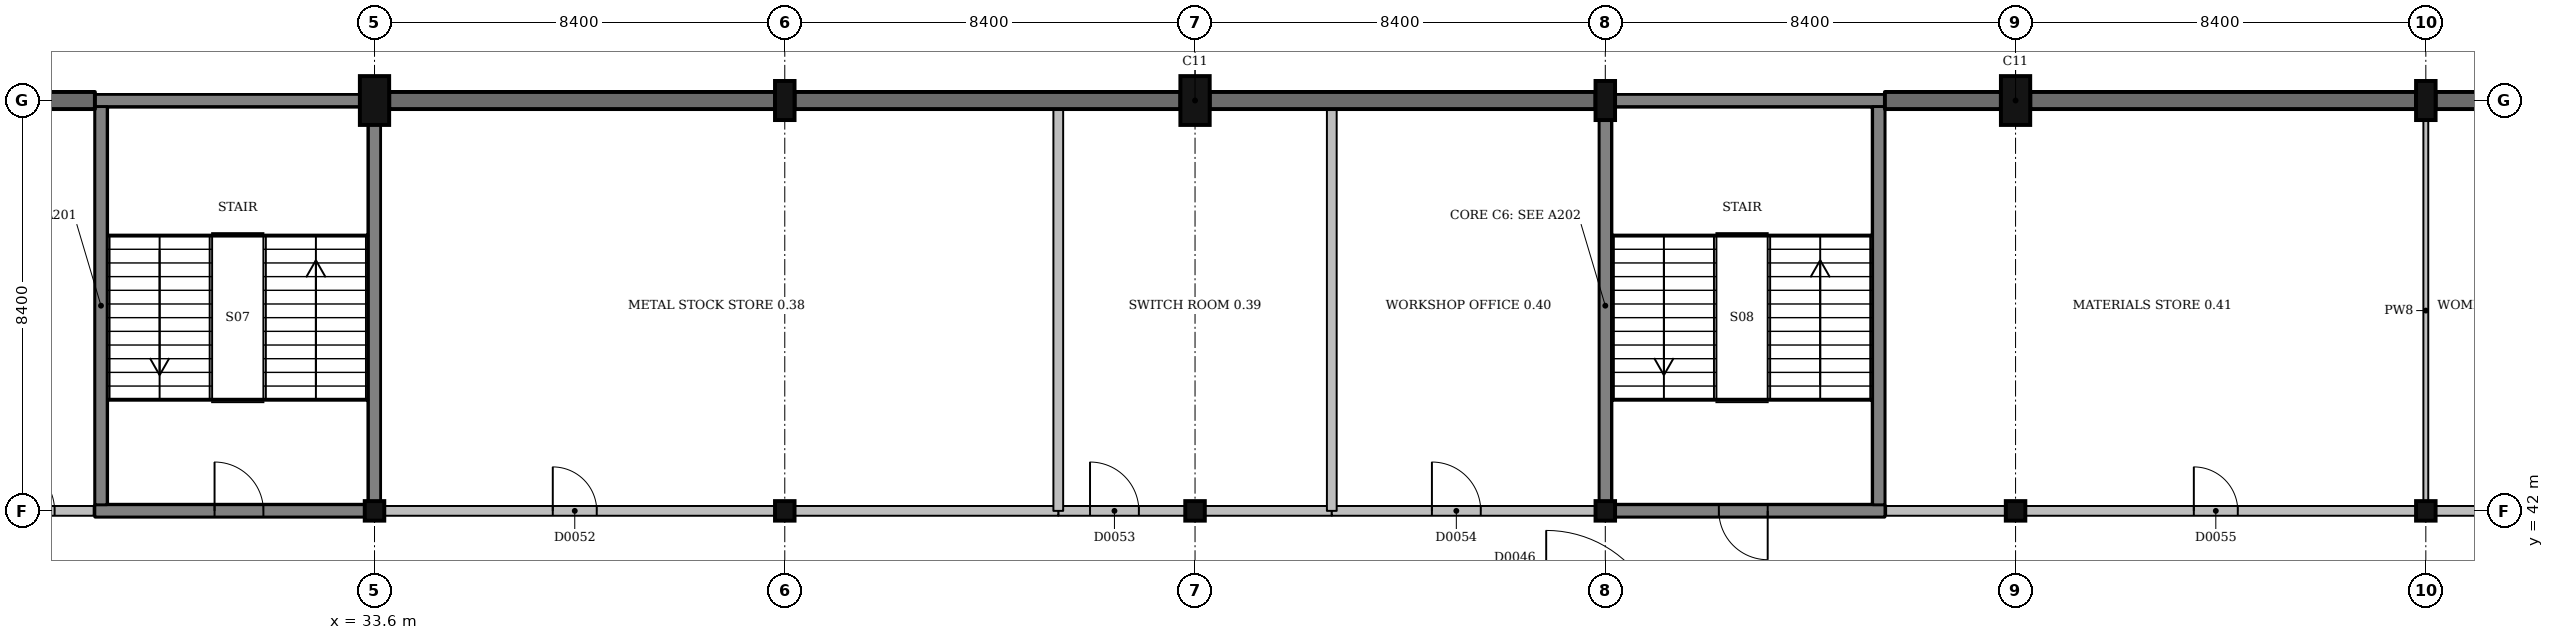
"""IFC4 building model, lengths in metres.
Left out: names, types, materials, properties, quantities, classifications, styles, units other than length and angle.
Written with IfcOpenShell. Run it as: python <this file> out.ifc"""

import sys

from ifc_helpers import new_model, si_unit, direction, frame, frame_2d, origin, origin_2d, place, context, subcontext, project, spatial, rectangle, extrude, element, fill, save


model = new_model("IFC4")
c1 = context("Model", 3, precision=1e-05, world=origin(), true_north=direction((0.0, 1.0)))
c2 = subcontext(c1, "Body", "Model", "MODEL_VIEW")
j1 = project(units=[si_unit("LENGTHUNIT", "METRE"), si_unit("PLANEANGLEUNIT", "RADIAN")], contexts=[c1])
p1 = place(None, origin())
s1 = spatial("IfcSite", under=j1, at=p1, CompositionType="ELEMENT")
p2 = place(p1, origin())
s2 = spatial("IfcBuilding", under=s1, at=p2, CompositionType="ELEMENT")
p3 = place(p2, origin())
s3 = spatial("IfcBuildingStorey", under=s2, at=p3, CompositionType="ELEMENT", Elevation=0.0)
p4 = place(p3, frame((33.6, 42.0, -1.5), z_axis=(0.0, 0.0, 1.0), x_axis=(1.0, 0.0, 0.0)))
e1 = element("IfcColumn", 1, at=p4, inside=s3, PredefinedType="COLUMN", context=c2, shape_type="SweptSolid", body=[
    extrude(rectangle(XDim=0.4, YDim=0.4, at=origin_2d()), origin(), (0.0, 0.0, 1.0), 6.0),
])
p5 = place(p3, frame((33.6, 50.4, -1.5), z_axis=(0.0, 0.0, 1.0), x_axis=(1.0, 0.0, 0.0)))
e2 = element("IfcColumn", 2, at=p5, inside=s3, PredefinedType="COLUMN", context=c2, shape_type="SweptSolid", body=[
    extrude(rectangle(XDim=0.6, YDim=1.0, at=origin_2d()), origin(), (0.0, 0.0, 1.0), 6.0),
])
p6 = place(p3, frame((42.0, 42.0, -1.5), z_axis=(0.0, 0.0, 1.0), x_axis=(1.0, 0.0, 0.0)))
e3 = element("IfcColumn", 3, at=p6, inside=s3, PredefinedType="COLUMN", context=c2, shape_type="SweptSolid", body=[
    extrude(rectangle(XDim=0.4, YDim=0.4, at=origin_2d()), origin(), (0.0, 0.0, 1.0), 6.0),
])
p7 = place(p3, frame((42.0, 50.4, -0.35), z_axis=(0.0, 0.0, 1.0), x_axis=(1.0, 0.0, 0.0)))
e4 = element("IfcColumn", 4, at=p7, inside=s3, PredefinedType="COLUMN", context=c2, shape_type="SweptSolid", body=[
    extrude(rectangle(XDim=0.4, YDim=0.8, at=origin_2d()), origin(), (0.0, 0.0, 1.0), 4.85),
])
p8 = place(p3, frame((50.4, 42.0, -1.5), z_axis=(0.0, 0.0, 1.0), x_axis=(1.0, 0.0, 0.0)))
e5 = element("IfcColumn", 5, at=p8, inside=s3, PredefinedType="COLUMN", context=c2, shape_type="SweptSolid", body=[
    extrude(rectangle(XDim=0.4, YDim=0.4, at=origin_2d()), origin(), (0.0, 0.0, 1.0), 6.0),
])
p9 = place(p3, frame((50.4, 50.4, -0.35), z_axis=(0.0, 0.0, 1.0), x_axis=(1.0, 0.0, 0.0)))
e6 = element("IfcColumn", 6, at=p9, inside=s3, PredefinedType="COLUMN", context=c2, shape_type="SweptSolid", body=[
    extrude(rectangle(XDim=0.6, YDim=1.0, at=origin_2d()), origin(), (0.0, 0.0, 1.0), 4.85),
])
p10 = place(p3, frame((58.8, 42.0, -1.5), z_axis=(0.0, 0.0, 1.0), x_axis=(1.0, 0.0, 0.0)))
e7 = element("IfcColumn", 7, at=p10, inside=s3, PredefinedType="COLUMN", context=c2, shape_type="SweptSolid", body=[
    extrude(rectangle(XDim=0.4, YDim=0.4, at=origin_2d()), origin(), (0.0, 0.0, 1.0), 6.0),
])
p11 = place(p3, frame((58.8, 50.4, -1.5), z_axis=(0.0, 0.0, 1.0), x_axis=(1.0, 0.0, 0.0)))
e8 = element("IfcColumn", 8, at=p11, inside=s3, PredefinedType="COLUMN", context=c2, shape_type="SweptSolid", body=[
    extrude(rectangle(XDim=0.4, YDim=0.8, at=origin_2d()), origin(), (0.0, 0.0, 1.0), 6.0),
])
p12 = place(p3, frame((67.2, 42.0, -1.5), z_axis=(0.0, 0.0, 1.0), x_axis=(1.0, 0.0, 0.0)))
e9 = element("IfcColumn", 9, at=p12, inside=s3, PredefinedType="COLUMN", context=c2, shape_type="SweptSolid", body=[
    extrude(rectangle(XDim=0.4, YDim=0.4, at=origin_2d()), origin(), (0.0, 0.0, 1.0), 6.0),
])
p13 = place(p3, frame((67.2, 50.4, -0.35), z_axis=(0.0, 0.0, 1.0), x_axis=(1.0, 0.0, 0.0)))
e10 = element("IfcColumn", 10, at=p13, inside=s3, PredefinedType="COLUMN", context=c2, shape_type="SweptSolid", body=[
    extrude(rectangle(XDim=0.6, YDim=1.0, at=origin_2d()), origin(), (0.0, 0.0, 1.0), 4.85),
])
p14 = place(p3, frame((75.6, 42.0, -1.5), z_axis=(0.0, 0.0, 1.0), x_axis=(1.0, 0.0, 0.0)))
e11 = element("IfcColumn", 11, at=p14, inside=s3, PredefinedType="COLUMN", context=c2, shape_type="SweptSolid", body=[
    extrude(rectangle(XDim=0.4, YDim=0.4, at=origin_2d()), origin(), (0.0, 0.0, 1.0), 6.0),
])
p15 = place(p3, frame((75.6, 50.4, -0.35), z_axis=(0.0, 0.0, 1.0), x_axis=(1.0, 0.0, 0.0)))
e12 = element("IfcColumn", 12, at=p15, inside=s3, PredefinedType="COLUMN", context=c2, shape_type="SweptSolid", body=[
    extrude(rectangle(XDim=0.4, YDim=0.8, at=origin_2d()), origin(), (0.0, 0.0, 1.0), 4.85),
])
p16 = place(p3, frame((27.875, 42.0, 0.0), z_axis=(0.0, 0.0, 1.0), x_axis=(1.0, 0.0, 0.0)))
e13 = element("IfcWall", 13, at=p16, inside=s3, PredefinedType="SHEAR", context=c2, shape_type="SweptSolid", body=[
    extrude(rectangle(XDim=5.525, YDim=0.25, at=frame_2d((2.762, 0.0))), origin(), (0.0, 0.0, 1.0), 4.5),
])
p17 = place(p16, frame((2.45, 0.0, 0.0)))
e14 = element("IfcOpeningElement", 14, at=p17, cuts=e13, PredefinedType="OPENING", context=c2, shape_type="SweptSolid", body=[
    extrude(rectangle(XDim=1.0, YDim=2.1, at=frame_2d((0.5, 1.05))), frame((0.0, 0.135, 0.0), z_axis=(0.0, -1.0, 0.0), x_axis=(1.0, 0.0, 0.0)), (0.0, 0.0, 1.0), 0.27),
])
p18 = place(p3, frame((27.875, 50.4, 0.0), z_axis=(0.0, 0.0, 1.0), x_axis=(1.0, 0.0, 0.0)))
e15 = element("IfcWall", 15, at=p18, inside=s3, PredefinedType="SHEAR", context=c2, shape_type="SweptSolid", body=[
    extrude(rectangle(XDim=5.425, YDim=0.25, at=frame_2d((2.712, 0.0))), origin(), (0.0, 0.0, 1.0), 4.5),
])
p19 = place(p3, frame((28.0, 42.125, 0.0), z_axis=(0.0, 0.0, 1.0), x_axis=(0.0, 1.0, 0.0)))
e16 = element("IfcWall", 16, at=p19, inside=s3, PredefinedType="SHEAR", context=c2, shape_type="SweptSolid", body=[
    extrude(rectangle(XDim=8.15, YDim=0.25, at=frame_2d((4.075, 0.0))), origin(), (0.0, 0.0, 1.0), 4.5),
])
p20 = place(p3, frame((33.6, 42.2, 0.0), z_axis=(0.0, 0.0, 1.0), x_axis=(0.0, 1.0, 0.0)))
e17 = element("IfcWall", 17, at=p20, inside=s3, PredefinedType="SHEAR", context=c2, shape_type="SweptSolid", body=[
    extrude(rectangle(XDim=7.7, YDim=0.25, at=frame_2d((3.85, 0.0))), origin(), (0.0, 0.0, 1.0), 4.5),
])
p21 = place(p3, frame((59.0, 42.0, 0.0), z_axis=(0.0, 0.0, 1.0), x_axis=(1.0, 0.0, 0.0)))
e18 = element("IfcWall", 18, at=p21, inside=s3, PredefinedType="SHEAR", context=c2, shape_type="SweptSolid", body=[
    extrude(rectangle(XDim=5.525, YDim=0.25, at=frame_2d((2.762, 0.0))), origin(), (0.0, 0.0, 1.0), 4.5),
])
p22 = place(p21, frame((2.125, 0.0, 0.0)))
e19 = element("IfcOpeningElement", 19, at=p22, cuts=e18, PredefinedType="OPENING", context=c2, shape_type="SweptSolid", body=[
    extrude(rectangle(XDim=1.0, YDim=2.1, at=frame_2d((0.5, 1.05))), frame((0.0, 0.135, 0.0), z_axis=(0.0, -1.0, 0.0), x_axis=(1.0, 0.0, 0.0)), (0.0, 0.0, 1.0), 0.27),
])
p23 = place(p3, frame((59.0, 50.4, 0.0), z_axis=(0.0, 0.0, 1.0), x_axis=(1.0, 0.0, 0.0)))
e20 = element("IfcWall", 20, at=p23, inside=s3, PredefinedType="SHEAR", context=c2, shape_type="SweptSolid", body=[
    extrude(rectangle(XDim=5.525, YDim=0.25, at=frame_2d((2.762, 0.0))), origin(), (0.0, 0.0, 1.0), 4.5),
])
p24 = place(p3, frame((58.8, 42.2, 0.0), z_axis=(0.0, 0.0, 1.0), x_axis=(0.0, 1.0, 0.0)))
e21 = element("IfcWall", 21, at=p24, inside=s3, PredefinedType="SHEAR", context=c2, shape_type="SweptSolid", body=[
    extrude(rectangle(XDim=7.8, YDim=0.25, at=frame_2d((3.9, 0.0))), origin(), (0.0, 0.0, 1.0), 4.5),
])
p25 = place(p3, frame((64.4, 42.125, 0.0), z_axis=(0.0, 0.0, 1.0), x_axis=(0.0, 1.0, 0.0)))
e22 = element("IfcWall", 22, at=p25, inside=s3, PredefinedType="SHEAR", context=c2, shape_type="SweptSolid", body=[
    extrude(rectangle(XDim=8.15, YDim=0.25, at=frame_2d((4.075, 0.0))), origin(), (0.0, 0.0, 1.0), 4.5),
])
for number, where, z_axis, x_axis in (
    (23, (27.875, 42.0, -1.5), (0.0, 0.0, 1.0), (1.0, 0.0, 0.0)),
    (24, (27.875, 50.4, -1.5), (0.0, 0.0, 1.0), (1.0, 0.0, 0.0)),
):
    element("IfcWall", number, at=place(p3, frame(where, z_axis=z_axis, x_axis=x_axis)), inside=s3, PredefinedType="SHEAR", context=c2, shape_type="SweptSolid", body=[
        extrude(rectangle(XDim=5.85, YDim=0.25, at=frame_2d((2.925, 0.0))), origin(), (0.0, 0.0, 1.0), 1.5),
    ])
for number, where, z_axis, x_axis in (
    (25, (28.0, 42.125, -1.5), (0.0, 0.0, 1.0), (0.0, 1.0, 0.0)),
    (26, (33.6, 42.125, -1.5), (0.0, 0.0, 1.0), (0.0, 1.0, 0.0)),
):
    element("IfcWall", number, at=place(p3, frame(where, z_axis=z_axis, x_axis=x_axis)), inside=s3, PredefinedType="SHEAR", context=c2, shape_type="SweptSolid", body=[
        extrude(rectangle(XDim=8.15, YDim=0.25, at=frame_2d((4.075, 0.0))), origin(), (0.0, 0.0, 1.0), 1.5),
    ])
for number, where, z_axis, x_axis in (
    (27, (58.675, 42.0, -1.5), (0.0, 0.0, 1.0), (1.0, 0.0, 0.0)),
    (28, (58.675, 50.4, -1.5), (0.0, 0.0, 1.0), (1.0, 0.0, 0.0)),
):
    element("IfcWall", number, at=place(p3, frame(where, z_axis=z_axis, x_axis=x_axis)), inside=s3, PredefinedType="SHEAR", context=c2, shape_type="SweptSolid", body=[
        extrude(rectangle(XDim=5.85, YDim=0.25, at=frame_2d((2.925, 0.0))), origin(), (0.0, 0.0, 1.0), 1.5),
    ])
for number, where, z_axis, x_axis in (
    (29, (58.8, 42.125, -1.5), (0.0, 0.0, 1.0), (0.0, 1.0, 0.0)),
    (30, (64.4, 42.125, -1.5), (0.0, 0.0, 1.0), (0.0, 1.0, 0.0)),
):
    element("IfcWall", number, at=place(p3, frame(where, z_axis=z_axis, x_axis=x_axis)), inside=s3, PredefinedType="SHEAR", context=c2, shape_type="SweptSolid", body=[
        extrude(rectangle(XDim=8.15, YDim=0.25, at=frame_2d((4.075, 0.0))), origin(), (0.0, 0.0, 1.0), 1.5),
    ])
p26 = place(p3, frame((41.8, 50.4, -0.35), z_axis=(0.0, 0.0, 1.0), x_axis=(-1.0, 0.0, 0.0)))
e31 = element("IfcWall", 31, at=p26, inside=s3, PredefinedType="SOLIDWALL", context=c2, shape_type="SweptSolid", body=[
    extrude(rectangle(XDim=7.9, YDim=0.35, at=frame_2d((3.95, 0.0))), origin(), (0.0, 0.0, 1.0), 3.8),
])
for number, where, z_axis, x_axis in (
    (32, (83.7, 50.4, -0.35), (0.0, 0.0, 1.0), (-1.0, 0.0, 0.0)),
    (33, (75.4, 50.4, -0.35), (0.0, 0.0, 1.0), (-1.0, 0.0, 0.0)),
):
    element("IfcWall", number, at=place(p3, frame(where, z_axis=z_axis, x_axis=x_axis)), inside=s3, PredefinedType="SOLIDWALL", context=c2, shape_type="SweptSolid", body=[
        extrude(rectangle(XDim=7.9, YDim=0.35, at=frame_2d((3.95, 0.0))), origin(), (0.0, 0.0, 1.0), 3.8),
    ])
for number, where, z_axis, x_axis in (
    (34, (58.6, 50.4, -0.35), (0.0, 0.0, 1.0), (-1.0, 0.0, 0.0)),
    (35, (50.1, 50.4, -0.35), (0.0, 0.0, 1.0), (-1.0, 0.0, 0.0)),
):
    element("IfcWall", number, at=place(p3, frame(where, z_axis=z_axis, x_axis=x_axis)), inside=s3, PredefinedType="SOLIDWALL", context=c2, shape_type="SweptSolid", body=[
        extrude(rectangle(XDim=7.9, YDim=0.35, at=frame_2d((3.95, 0.0))), origin(), (0.0, 0.0, 1.0), 3.8),
    ])
p27 = place(p3, frame((25.4, 42.0, 0.0), z_axis=(0.0, 0.0, 1.0), x_axis=(1.0, 0.0, 0.0)))
e36 = element("IfcWall", 36, at=p27, inside=s3, PredefinedType="PARTITIONING", context=c2, shape_type="SweptSolid", body=[
    extrude(rectangle(XDim=2.45, YDim=0.2, at=frame_2d((1.225, 0.0))), origin(), (0.0, 0.0, 1.0), 3.45),
])
p28 = place(p27, frame((0.65, 0.0, 0.0)))
e37 = element("IfcOpeningElement", 37, at=p28, cuts=e36, PredefinedType="OPENING", context=c2, shape_type="SweptSolid", body=[
    extrude(rectangle(XDim=1.0, YDim=2.1, at=frame_2d((0.5, 1.05))), frame((0.0, 0.11, 0.0), z_axis=(0.0, -1.0, 0.0), x_axis=(1.0, 0.0, 0.0)), (0.0, 0.0, 1.0), 0.22),
])
p29 = place(p3, frame((47.6, 42.0, 0.0), z_axis=(0.0, 0.0, 1.0), x_axis=(1.0, 0.0, 0.0)))
e38 = element("IfcWall", 38, at=p29, inside=s3, PredefinedType="PARTITIONING", context=c2, shape_type="SweptSolid", body=[
    extrude(rectangle(XDim=2.6, YDim=0.2, at=frame_2d((1.3, 0.0))), origin(), (0.0, 0.0, 1.0), 3.45),
])
p30 = place(p29, frame((0.65, 0.0, 0.0)))
e39 = element("IfcOpeningElement", 39, at=p30, cuts=e38, PredefinedType="OPENING", context=c2, shape_type="SweptSolid", body=[
    extrude(rectangle(XDim=1.0, YDim=2.1, at=frame_2d((0.5, 1.05))), frame((0.0, 0.11, 0.0), z_axis=(0.0, -1.0, 0.0), x_axis=(1.0, 0.0, 0.0)), (0.0, 0.0, 1.0), 0.22),
])
p31 = place(p3, frame((50.6, 42.0, 0.0), z_axis=(0.0, 0.0, 1.0), x_axis=(1.0, 0.0, 0.0)))
e40 = element("IfcWall", 40, at=p31, inside=s3, PredefinedType="PARTITIONING", context=c2, shape_type="SweptSolid", body=[
    extrude(rectangle(XDim=2.6, YDim=0.2, at=frame_2d((1.3, 0.0))), origin(), (0.0, 0.0, 1.0), 3.45),
])
p32 = place(p3, frame((33.8, 42.0, 0.0), z_axis=(0.0, 0.0, 1.0), x_axis=(1.0, 0.0, 0.0)))
e41 = element("IfcWall", 41, at=p32, inside=s3, PredefinedType="PARTITIONING", context=c2, shape_type="SweptSolid", body=[
    extrude(rectangle(XDim=8.0, YDim=0.2, at=frame_2d((4.0, 0.0))), origin(), (0.0, 0.0, 1.0), 3.45),
])
p33 = place(p32, frame((3.45, 0.0, 0.0)))
e42 = element("IfcOpeningElement", 42, at=p33, cuts=e41, PredefinedType="OPENING", context=c2, shape_type="SweptSolid", body=[
    extrude(rectangle(XDim=0.9, YDim=2.1, at=frame_2d((0.45, 1.05))), frame((0.0, 0.11, 0.0), z_axis=(0.0, -1.0, 0.0), x_axis=(1.0, 0.0, 0.0)), (0.0, 0.0, 1.0), 0.22),
])
p34 = place(p3, frame((42.2, 42.0, 0.0), z_axis=(0.0, 0.0, 1.0), x_axis=(1.0, 0.0, 0.0)))
e43 = element("IfcWall", 43, at=p34, inside=s3, PredefinedType="PARTITIONING", context=c2, shape_type="SweptSolid", body=[
    extrude(rectangle(XDim=5.4, YDim=0.2, at=frame_2d((2.7, 0.0))), origin(), (0.0, 0.0, 1.0), 3.45),
])
p35 = place(p3, frame((53.2, 42.0, 0.0), z_axis=(0.0, 0.0, 1.0), x_axis=(1.0, 0.0, 0.0)))
e44 = element("IfcWall", 44, at=p35, inside=s3, PredefinedType="PARTITIONING", context=c2, shape_type="SweptSolid", body=[
    extrude(rectangle(XDim=5.4, YDim=0.2, at=frame_2d((2.7, 0.0))), origin(), (0.0, 0.0, 1.0), 3.45),
])
p36 = place(p35, frame((2.05, 0.0, 0.0)))
e45 = element("IfcOpeningElement", 45, at=p36, cuts=e44, PredefinedType="OPENING", context=c2, shape_type="SweptSolid", body=[
    extrude(rectangle(XDim=1.0, YDim=2.1, at=frame_2d((0.5, 1.05))), frame((0.0, 0.11, 0.0), z_axis=(0.0, -1.0, 0.0), x_axis=(1.0, 0.0, 0.0)), (0.0, 0.0, 1.0), 0.22),
])
p37 = place(p3, frame((64.55, 42.0, 0.0), z_axis=(0.0, 0.0, 1.0), x_axis=(1.0, 0.0, 0.0)))
e46 = element("IfcWall", 46, at=p37, inside=s3, PredefinedType="PARTITIONING", context=c2, shape_type="SweptSolid", body=[
    extrude(rectangle(XDim=2.45, YDim=0.2, at=frame_2d((1.225, 0.0))), origin(), (0.0, 0.0, 1.0), 3.45),
])
p38 = place(p3, frame((67.4, 42.0, 0.0), z_axis=(0.0, 0.0, 1.0), x_axis=(1.0, 0.0, 0.0)))
e47 = element("IfcWall", 47, at=p38, inside=s3, PredefinedType="PARTITIONING", context=c2, shape_type="SweptSolid", body=[
    extrude(rectangle(XDim=8.0, YDim=0.2, at=frame_2d((4.0, 0.0))), origin(), (0.0, 0.0, 1.0), 3.45),
])
p39 = place(p38, frame((3.45, 0.0, 0.0)))
e48 = element("IfcOpeningElement", 48, at=p39, cuts=e47, PredefinedType="OPENING", context=c2, shape_type="SweptSolid", body=[
    extrude(rectangle(XDim=0.9, YDim=2.1, at=frame_2d((0.45, 1.05))), frame((0.0, 0.11, 0.0), z_axis=(0.0, -1.0, 0.0), x_axis=(1.0, 0.0, 0.0)), (0.0, 0.0, 1.0), 0.22),
])
p40 = place(p3, frame((75.8, 42.0, 0.0), z_axis=(0.0, 0.0, 1.0), x_axis=(1.0, 0.0, 0.0)))
e49 = element("IfcWall", 49, at=p40, inside=s3, PredefinedType="PARTITIONING", context=c2, shape_type="SweptSolid", body=[
    extrude(rectangle(XDim=8.0, YDim=0.2, at=frame_2d((4.0, 0.0))), origin(), (0.0, 0.0, 1.0), 3.45),
])
p41 = place(p40, frame((1.0, 0.0, 0.0)))
e50 = element("IfcOpeningElement", 50, at=p41, cuts=e49, PredefinedType="OPENING", context=c2, shape_type="SweptSolid", body=[
    extrude(rectangle(XDim=0.9, YDim=2.1, at=frame_2d((0.45, 1.05))), frame((0.0, 0.11, 0.0), z_axis=(0.0, -1.0, 0.0), x_axis=(1.0, 0.0, 0.0)), (0.0, 0.0, 1.0), 0.22),
])
p42 = place(p40, frame((3.6, 0.0, 0.0)))
e51 = element("IfcOpeningElement", 51, at=p42, cuts=e49, PredefinedType="OPENING", context=c2, shape_type="SweptSolid", body=[
    extrude(rectangle(XDim=0.9, YDim=2.1, at=frame_2d((0.45, 1.05))), frame((0.0, 0.11, 0.0), z_axis=(0.0, -1.0, 0.0), x_axis=(1.0, 0.0, 0.0)), (0.0, 0.0, 1.0), 0.22),
])
p43 = place(p40, frame((6.05, 0.0, 0.0)))
e52 = element("IfcOpeningElement", 52, at=p43, cuts=e49, PredefinedType="OPENING", context=c2, shape_type="SweptSolid", body=[
    extrude(rectangle(XDim=1.0, YDim=2.1, at=frame_2d((0.5, 1.05))), frame((0.0, 0.11, 0.0), z_axis=(0.0, -1.0, 0.0), x_axis=(1.0, 0.0, 0.0)), (0.0, 0.0, 1.0), 0.22),
])
for number, where, z_axis, x_axis in (
    (53, (47.6, 42.0, 0.0), (0.0, 0.0, 1.0), (0.0, 1.0, 0.0)),
    (54, (53.2, 42.0, 0.0), (0.0, 0.0, 1.0), (0.0, 1.0, 0.0)),
):
    element("IfcWall", number, at=place(p3, frame(where, z_axis=z_axis, x_axis=x_axis)), inside=s3, PredefinedType="PARTITIONING", context=c2, shape_type="SweptSolid", body=[
        extrude(rectangle(XDim=8.225, YDim=0.2, at=frame_2d((4.113, 0.0))), origin(), (0.0, 0.0, 1.0), 3.45),
    ])
p44 = place(p3, frame((75.6, 42.2, 0.0), z_axis=(0.0, 0.0, 1.0), x_axis=(0.0, 1.0, 0.0)))
e55 = element("IfcWall", 55, at=p44, inside=s3, PredefinedType="PARTITIONING", context=c2, shape_type="SweptSolid", body=[
    extrude(rectangle(XDim=7.8, YDim=0.1, at=frame_2d((3.9, 0.0))), origin(), (0.0, 0.0, 1.0), 3.5),
])
p45 = place(p3, frame((27.875, 50.4, -0.35), z_axis=(0.0, 0.0, 1.0), x_axis=(-1.0, 0.0, 0.0)))
e56 = element("IfcWall", 56, at=p45, inside=s3, PredefinedType="SOLIDWALL", context=c2, shape_type="SweptSolid", body=[
    extrude(rectangle(XDim=2.475, YDim=0.35, at=frame_2d((1.238, 0.0))), origin(), (0.0, 0.0, 1.0), 3.8),
])
p46 = place(p3, frame((66.9, 50.4, -0.35), z_axis=(0.0, 0.0, 1.0), x_axis=(-1.0, 0.0, 0.0)))
e57 = element("IfcWall", 57, at=p46, inside=s3, PredefinedType="SOLIDWALL", context=c2, shape_type="SweptSolid", body=[
    extrude(rectangle(XDim=2.375, YDim=0.35, at=frame_2d((1.188, 0.0))), origin(), (0.0, 0.0, 1.0), 3.8),
])
p47 = place(p28, origin())
e58 = element("IfcDoor", 58, at=p47, inside=s3, OperationType="SINGLE_SWING_LEFT", PredefinedType="DOOR", context=c2, shape_type="SweptSolid", body=[
    extrude(rectangle(XDim=1.0, YDim=2.1, at=frame_2d((0.5, 1.05))), frame((0.0, 0.025, 0.0), z_axis=(0.0, -1.0, 0.0), x_axis=(1.0, 0.0, 0.0)), (0.0, 0.0, 1.0), 0.05),
])
fill(e37, e58)
p48 = place(p33, origin())
e59 = element("IfcDoor", 59, at=p48, inside=s3, OperationType="SINGLE_SWING_LEFT", PredefinedType="DOOR", context=c2, shape_type="SweptSolid", body=[
    extrude(rectangle(XDim=0.9, YDim=2.1, at=frame_2d((0.45, 1.05))), frame((0.0, 0.025, 0.0), z_axis=(0.0, -1.0, 0.0), x_axis=(1.0, 0.0, 0.0)), (0.0, 0.0, 1.0), 0.05),
])
fill(e42, e59)
p49 = place(p30, origin())
e60 = element("IfcDoor", 60, at=p49, inside=s3, OperationType="SINGLE_SWING_LEFT", PredefinedType="DOOR", context=c2, shape_type="SweptSolid", body=[
    extrude(rectangle(XDim=1.0, YDim=2.1, at=frame_2d((0.5, 1.05))), frame((0.0, 0.025, 0.0), z_axis=(0.0, -1.0, 0.0), x_axis=(1.0, 0.0, 0.0)), (0.0, 0.0, 1.0), 0.05),
])
fill(e39, e60)
p50 = place(p36, origin())
e61 = element("IfcDoor", 61, at=p50, inside=s3, OperationType="SINGLE_SWING_LEFT", PredefinedType="DOOR", context=c2, shape_type="SweptSolid", body=[
    extrude(rectangle(XDim=1.0, YDim=2.1, at=frame_2d((0.5, 1.05))), frame((0.0, 0.025, 0.0), z_axis=(0.0, -1.0, 0.0), x_axis=(1.0, 0.0, 0.0)), (0.0, 0.0, 1.0), 0.05),
])
fill(e45, e61)
p51 = place(p39, origin())
e62 = element("IfcDoor", 62, at=p51, inside=s3, OperationType="SINGLE_SWING_LEFT", PredefinedType="DOOR", context=c2, shape_type="SweptSolid", body=[
    extrude(rectangle(XDim=0.9, YDim=2.1, at=frame_2d((0.45, 1.05))), frame((0.0, 0.025, 0.0), z_axis=(0.0, -1.0, 0.0), x_axis=(1.0, 0.0, 0.0)), (0.0, 0.0, 1.0), 0.05),
])
fill(e48, e62)
p52 = place(p17, origin())
e63 = element("IfcDoor", 63, at=p52, inside=s3, OperationType="SINGLE_SWING_LEFT", PredefinedType="DOOR", context=c2, shape_type="SweptSolid", body=[
    extrude(rectangle(XDim=1.0, YDim=2.1, at=frame_2d((0.5, 1.05))), frame((0.0, 0.025, 0.0), z_axis=(0.0, -1.0, 0.0), x_axis=(1.0, 0.0, 0.0)), (0.0, 0.0, 1.0), 0.05),
])
fill(e14, e63)
p53 = place(p22, origin())
e64 = element("IfcDoor", 64, at=p53, inside=s3, OperationType="SINGLE_SWING_RIGHT", PredefinedType="DOOR", context=c2, shape_type="SweptSolid", body=[
    extrude(rectangle(XDim=1.0, YDim=2.1, at=frame_2d((0.5, 1.05))), frame((0.0, 0.025, 0.0), z_axis=(0.0, -1.0, 0.0), x_axis=(1.0, 0.0, 0.0)), (0.0, 0.0, 1.0), 0.05),
])
fill(e19, e64)
save(model, sys.argv[1])
